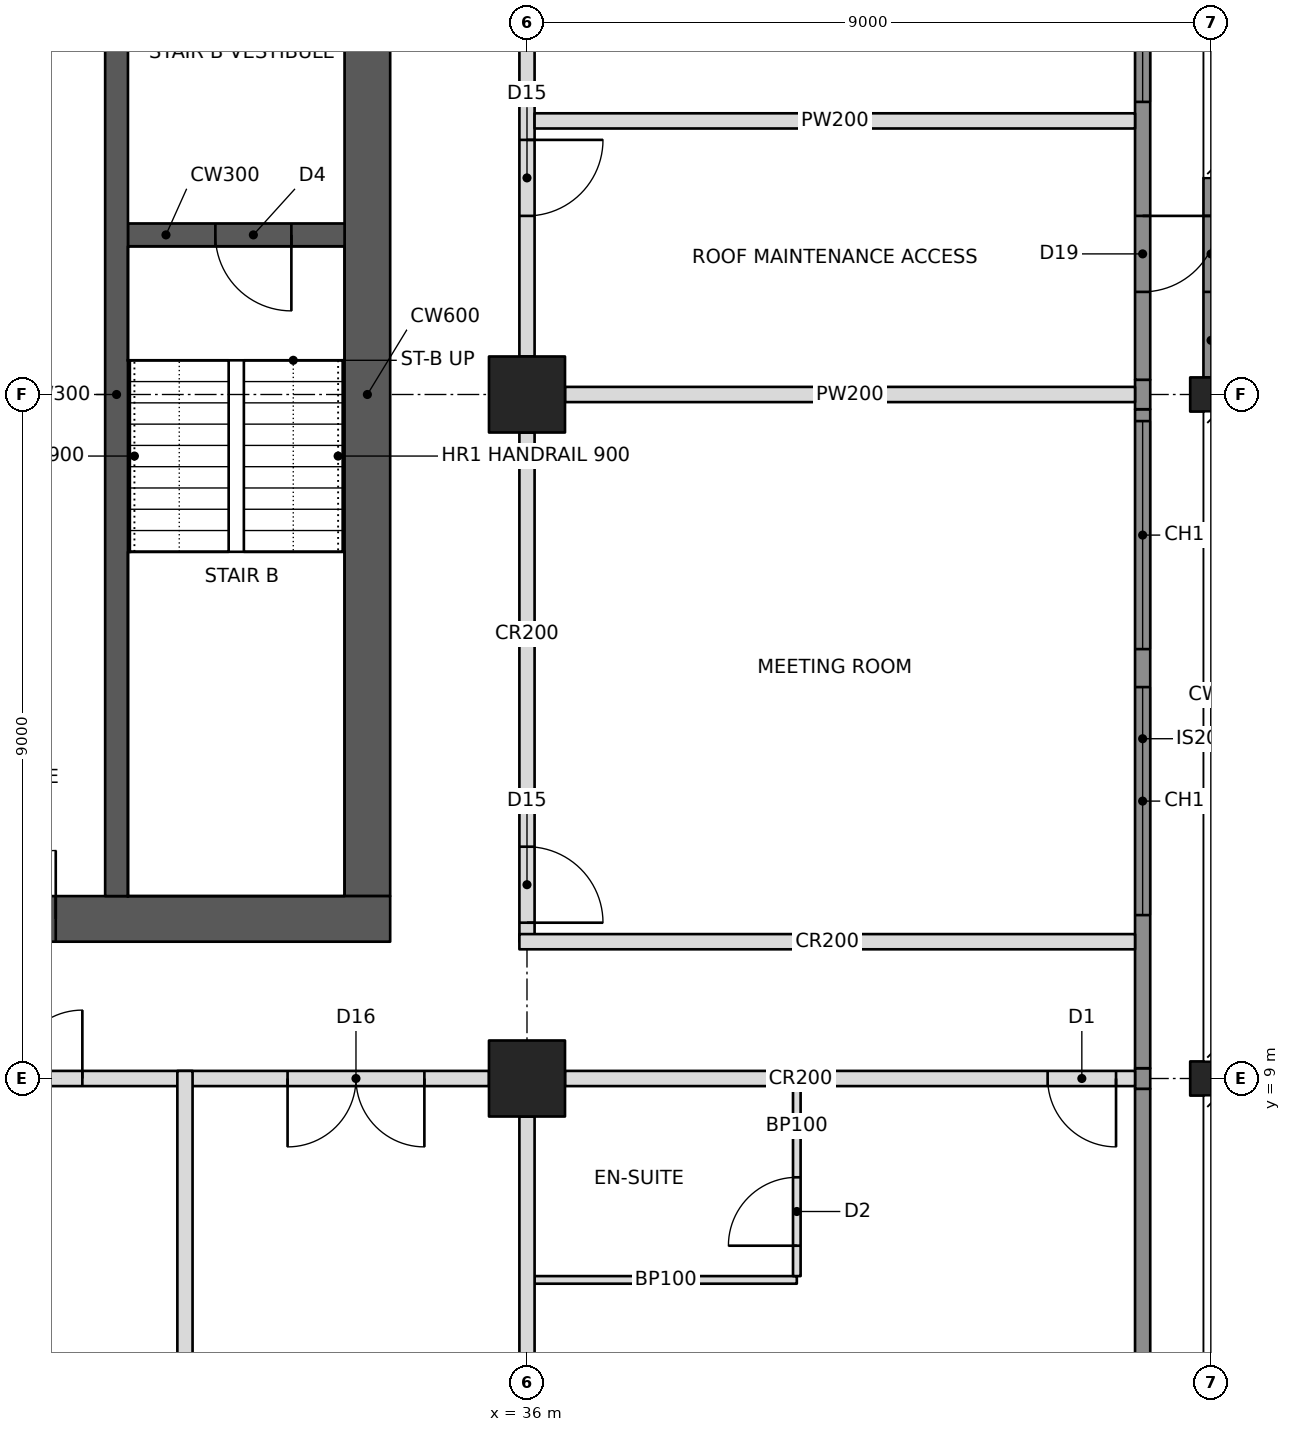
"""IFC4 building model, lengths in metres.
Left out: names, types, materials, properties, quantities, classifications, styles, units other than length and angle.
Written with IfcOpenShell. Run it as: python <this file> out.ifc"""

import sys

from ifc_helpers import new_model, si_unit, direction, frame, frame_2d, origin, origin_2d, place, context, subcontext, project, spatial, rectangle, hollow_rectangle, i_section, extrude, element, fill, save


model = new_model("IFC4")
c1 = context("Model", 3, precision=1e-05, world=origin(), true_north=direction((0.0, 1.0)))
c2 = subcontext(c1, "Body", "Model", "MODEL_VIEW")
j1 = project(units=[si_unit("LENGTHUNIT", "METRE"), si_unit("PLANEANGLEUNIT", "RADIAN")], contexts=[c1])
p1 = place(None, origin())
s1 = spatial("IfcSite", under=j1, at=p1, CompositionType="ELEMENT")
p2 = place(p1, origin())
s2 = spatial("IfcBuilding", under=s1, at=p2, CompositionType="ELEMENT")
p3 = place(p2, frame((0.0, 0.0, 94.2)))
s3 = spatial("IfcBuildingStorey", under=s2, at=p3, CompositionType="ELEMENT", Elevation=94.2)
for number, where, z_axis, x_axis in (
    (1, (36.0, 9.0, 0.0), (0.0, 0.0, 1.0), (0.0, 1.0, 0.0)),
    (2, (36.0, 18.0, 0.0), (0.0, 0.0, 1.0), (0.0, 1.0, 0.0)),
):
    element("IfcColumn", number, at=place(p3, frame(where, z_axis=z_axis, x_axis=x_axis)), inside=s3, PredefinedType="COLUMN", context=c2, shape_type="SweptSolid", body=[
        extrude(hollow_rectangle(XDim=1.0, YDim=1.0, WallThickness=0.1, at=origin_2d()), origin(), (0.0, 0.0, 1.0), 3.4),
    ])
for number, where, z_axis, x_axis in (
    (3, (45.0, 9.0, 0.0), (0.0, 0.0, 1.0), (0.0, 1.0, 0.0)),
    (4, (45.0, 18.0, 0.0), (0.0, 0.0, 1.0), (0.0, 1.0, 0.0)),
):
    element("IfcColumn", number, at=place(p3, frame(where, z_axis=z_axis, x_axis=x_axis)), inside=s3, PredefinedType="COLUMN", context=c2, shape_type="SweptSolid", body=[
        extrude(i_section(OverallWidth=0.449, OverallDepth=0.549, WebThickness=0.072, FlangeThickness=0.115, at=origin_2d()), origin(), (0.0, 0.0, 1.0), 3.4),
    ])
p4 = place(p3, frame((10.8, 11.1, 0.0), z_axis=(0.0, 0.0, 1.0), x_axis=(1.0, 0.0, 0.0)))
e5 = element("IfcWall", 5, at=p4, inside=s3, PredefinedType="SHEAR", context=c2, shape_type="SweptSolid", body=[
    extrude(rectangle(XDim=23.4, YDim=0.6, at=frame_2d((11.7, 0.0))), origin(), (0.0, 0.0, 1.0), 3.4),
])
p5 = place(p4, frame((1.0, 0.0, 0.0)))
e6 = element("IfcOpeningElement", 6, at=p5, cuts=e5, PredefinedType="OPENING", context=c2, shape_type="SweptSolid", body=[
    extrude(rectangle(XDim=1.0, YDim=2.1, at=frame_2d((0.5, 1.05))), frame((0.0, 0.31, 0.0), z_axis=(0.0, -1.0, 0.0), x_axis=(1.0, 0.0, 0.0)), (0.0, 0.0, 1.0), 0.62),
])
p6 = place(p4, frame((17.2, 0.0, 0.0)))
e7 = element("IfcOpeningElement", 7, at=p6, cuts=e5, PredefinedType="OPENING", context=c2, shape_type="SweptSolid", body=[
    extrude(rectangle(XDim=1.8, YDim=2.1, at=frame_2d((0.9, 1.05))), frame((0.0, 0.31, 0.0), z_axis=(0.0, -1.0, 0.0), x_axis=(1.0, 0.0, 0.0)), (0.0, 0.0, 1.0), 0.62),
])
p7 = place(p3, frame((33.9, 11.4, 0.0), z_axis=(0.0, 0.0, 1.0), x_axis=(0.0, 1.0, 0.0)))
e8 = element("IfcWall", 8, at=p7, inside=s3, PredefinedType="SHEAR", context=c2, shape_type="SweptSolid", body=[
    extrude(rectangle(XDim=13.2, YDim=0.6, at=frame_2d((6.6, 0.0))), origin(), (0.0, 0.0, 1.0), 3.4),
])
p8 = place(p3, frame((30.6, 11.4, 0.0), z_axis=(0.0, 0.0, 1.0), x_axis=(0.0, 1.0, 0.0)))
e9 = element("IfcWall", 9, at=p8, inside=s3, PredefinedType="SHEAR", context=c2, shape_type="SweptSolid", body=[
    extrude(rectangle(XDim=13.2, YDim=0.3, at=frame_2d((6.6, 0.0))), origin(), (0.0, 0.0, 1.0), 3.4),
])
p9 = place(p3, frame((30.75, 20.1, 0.0), z_axis=(0.0, 0.0, 1.0), x_axis=(1.0, 0.0, 0.0)))
e10 = element("IfcWall", 10, at=p9, inside=s3, PredefinedType="SHEAR", context=c2, shape_type="SweptSolid", body=[
    extrude(rectangle(XDim=2.85, YDim=0.3, at=frame_2d((1.425, 0.0))), origin(), (0.0, 0.0, 1.0), 3.4),
])
p10 = place(p9, frame((1.15, 0.0, 0.0)))
e11 = element("IfcOpeningElement", 11, at=p10, cuts=e10, PredefinedType="OPENING", context=c2, shape_type="SweptSolid", body=[
    extrude(rectangle(XDim=1.0, YDim=2.1, at=frame_2d((0.5, 1.05))), frame((0.0, 0.16, 0.0), z_axis=(0.0, -1.0, 0.0), x_axis=(1.0, 0.0, 0.0)), (0.0, 0.0, 1.0), 0.32),
])
p11 = place(p3, frame((45.0, 20.85, 0.0), z_axis=(0.0, 0.0, 1.0), x_axis=(0.0, -1.0, 0.0)))
e12 = element("IfcWall", 12, at=p11, inside=s3, PredefinedType="SOLIDWALL", context=c2, shape_type="SweptSolid", body=[
    extrude(rectangle(XDim=2.625, YDim=0.2, at=frame_2d((1.312, 0.0))), origin(), (0.0, 0.0, 1.0), 2.42),
])
p12 = place(p11, frame((0.5, 0.0, 0.0)))
e13 = element("IfcOpeningElement", 13, at=p12, cuts=e12, PredefinedType="OPENING", context=c2, shape_type="SweptSolid", body=[
    extrude(rectangle(XDim=1.0, YDim=2.1, at=frame_2d((0.5, 1.05))), frame((0.0, 0.11, 0.0), z_axis=(0.0, -1.0, 0.0), x_axis=(1.0, 0.0, 0.0)), (0.0, 0.0, 1.0), 0.22),
])
p13 = place(p3, frame((27.5, 9.0, 0.0), z_axis=(0.0, 0.0, 1.0), x_axis=(1.0, 0.0, 0.0)))
e14 = element("IfcWall", 14, at=p13, inside=s3, PredefinedType="PARTITIONING", context=c2, shape_type="SweptSolid", body=[
    extrude(rectangle(XDim=8.0, YDim=0.2, at=frame_2d((4.0, 0.0))), origin(), (0.0, 0.0, 1.0), 2.405),
])
p14 = place(p13, frame((0.85, 0.0, 0.0)))
e15 = element("IfcOpeningElement", 15, at=p14, cuts=e14, PredefinedType="OPENING", context=c2, shape_type="SweptSolid", body=[
    extrude(rectangle(XDim=1.8, YDim=2.4, at=frame_2d((0.9, 1.2))), frame((0.0, 0.11, 0.0), z_axis=(0.0, -1.0, 0.0), x_axis=(1.0, 0.0, 0.0)), (0.0, 0.0, 1.0), 0.22),
])
p15 = place(p13, frame((5.35, 0.0, 0.0)))
e16 = element("IfcOpeningElement", 16, at=p15, cuts=e14, PredefinedType="OPENING", context=c2, shape_type="SweptSolid", body=[
    extrude(rectangle(XDim=1.8, YDim=2.4, at=frame_2d((0.9, 1.2))), frame((0.0, 0.11, 0.0), z_axis=(0.0, -1.0, 0.0), x_axis=(1.0, 0.0, 0.0)), (0.0, 0.0, 1.0), 0.22),
])
p16 = place(p3, frame((36.5, 9.0, 0.0), z_axis=(0.0, 0.0, 1.0), x_axis=(1.0, 0.0, 0.0)))
e17 = element("IfcWall", 17, at=p16, inside=s3, PredefinedType="PARTITIONING", context=c2, shape_type="SweptSolid", body=[
    extrude(rectangle(XDim=7.5, YDim=0.2, at=frame_2d((3.75, 0.0))), origin(), (0.0, 0.0, 1.0), 2.438),
])
p17 = place(p16, frame((6.35, 0.0, 0.0)))
e18 = element("IfcOpeningElement", 18, at=p17, cuts=e17, PredefinedType="OPENING", context=c2, shape_type="SweptSolid", body=[
    extrude(rectangle(XDim=0.9, YDim=2.1, at=frame_2d((0.45, 1.05))), frame((0.0, 0.11, 0.0), z_axis=(0.0, -1.0, 0.0), x_axis=(1.0, 0.0, 0.0)), (0.0, 0.0, 1.0), 0.22),
])
p18 = place(p3, frame((36.0, 10.8, 0.0), z_axis=(0.0, 0.0, 1.0), x_axis=(0.0, 1.0, 0.0)))
e19 = element("IfcWall", 19, at=p18, inside=s3, PredefinedType="PARTITIONING", context=c2, shape_type="SweptSolid", body=[
    extrude(rectangle(XDim=6.7, YDim=0.2, at=frame_2d((3.35, 0.0))), origin(), (0.0, 0.0, 1.0), 2.405),
])
p19 = place(p18, frame((0.25, 0.0, 0.0)))
e20 = element("IfcOpeningElement", 20, at=p19, cuts=e19, PredefinedType="OPENING", context=c2, shape_type="SweptSolid", body=[
    extrude(rectangle(XDim=1.0, YDim=2.1, at=frame_2d((0.5, 1.05))), frame((0.0, 0.11, 0.0), z_axis=(0.0, -1.0, 0.0), x_axis=(1.0, 0.0, 0.0)), (0.0, 0.0, 1.0), 0.22),
])
p20 = place(p3, frame((36.0, 18.5, 0.0), z_axis=(0.0, 0.0, 1.0), x_axis=(0.0, 1.0, 0.0)))
e21 = element("IfcWall", 21, at=p20, inside=s3, PredefinedType="PARTITIONING", context=c2, shape_type="SweptSolid", body=[
    extrude(rectangle(XDim=6.7, YDim=0.2, at=frame_2d((3.35, 0.0))), origin(), (0.0, 0.0, 1.0), 2.405),
])
p21 = place(p20, frame((5.45, 0.0, 0.0)))
e22 = element("IfcOpeningElement", 22, at=p21, cuts=e21, PredefinedType="OPENING", context=c2, shape_type="SweptSolid", body=[
    extrude(rectangle(XDim=1.0, YDim=2.1, at=frame_2d((0.5, 1.05))), frame((0.0, 0.11, 0.0), z_axis=(0.0, -1.0, 0.0), x_axis=(1.0, 0.0, 0.0)), (0.0, 0.0, 1.0), 0.22),
])
p22 = place(p20, frame((1.85, 0.0, 0.0)))
e23 = element("IfcOpeningElement", 23, at=p22, cuts=e21, PredefinedType="OPENING", context=c2, shape_type="SweptSolid", body=[
    extrude(rectangle(XDim=1.0, YDim=2.1, at=frame_2d((0.5, 1.05))), frame((0.0, 0.11, 0.0), z_axis=(0.0, -1.0, 0.0), x_axis=(1.0, 0.0, 0.0)), (0.0, 0.0, 1.0), 0.22),
])
p23 = place(p3, frame((35.9, 10.8, 0.0), z_axis=(0.0, 0.0, 1.0), x_axis=(1.0, 0.0, 0.0)))
e24 = element("IfcWall", 24, at=p23, inside=s3, PredefinedType="PARTITIONING", context=c2, shape_type="SweptSolid", body=[
    extrude(rectangle(XDim=8.1, YDim=0.2, at=frame_2d((4.05, 0.0))), origin(), (0.0, 0.0, 1.0), 2.404),
])
p24 = place(p3, frame((36.0, 8.5, 0.0), z_axis=(0.0, 0.0, 1.0), x_axis=(0.0, -1.0, 0.0)))
e25 = element("IfcWall", 25, at=p24, inside=s3, PredefinedType="PARTITIONING", context=c2, shape_type="SweptSolid", body=[
    extrude(rectangle(XDim=7.5, YDim=0.2, at=frame_2d((3.75, 0.0))), origin(), (0.0, 0.0, 1.0), 2.438),
])
p25 = place(p3, frame((31.5, 9.1, 0.0), z_axis=(0.0, 0.0, 1.0), x_axis=(0.0, -1.0, 0.0)))
e26 = element("IfcWall", 26, at=p25, inside=s3, PredefinedType="PARTITIONING", context=c2, shape_type="SweptSolid", body=[
    extrude(rectangle(XDim=8.1, YDim=0.2, at=frame_2d((4.05, 0.0))), origin(), (0.0, 0.0, 1.0), 2.404),
])
p26 = place(p3, frame((36.1, 6.35, 0.0), z_axis=(0.0, 0.0, 1.0), x_axis=(1.0, 0.0, 0.0)))
e27 = element("IfcWall", 27, at=p26, inside=s3, PredefinedType="PARTITIONING", context=c2, shape_type="SweptSolid", body=[
    extrude(rectangle(XDim=3.45, YDim=0.1, at=frame_2d((1.725, 0.0))), origin(), (0.0, 0.0, 1.0), 2.438),
])
p27 = place(p3, frame((39.55, 8.9, 0.0), z_axis=(0.0, 0.0, 1.0), x_axis=(0.0, -1.0, 0.0)))
e28 = element("IfcWall", 28, at=p27, inside=s3, PredefinedType="PARTITIONING", context=c2, shape_type="SweptSolid", body=[
    extrude(rectangle(XDim=2.5, YDim=0.1, at=frame_2d((1.25, 0.0))), origin(), (0.0, 0.0, 1.0), 2.438),
])
p28 = place(p27, frame((1.2, 0.0, 0.0)))
e29 = element("IfcOpeningElement", 29, at=p28, cuts=e28, PredefinedType="OPENING", context=c2, shape_type="SweptSolid", body=[
    extrude(rectangle(XDim=0.9, YDim=2.1, at=frame_2d((0.45, 1.05))), frame((0.0, 0.06, 0.0), z_axis=(0.0, -1.0, 0.0), x_axis=(1.0, 0.0, 0.0)), (0.0, 0.0, 1.0), 0.12),
])
p29 = place(p3, frame((36.5, 18.0, 0.0), z_axis=(0.0, 0.0, 1.0), x_axis=(1.0, 0.0, 0.0)))
e30 = element("IfcWall", 30, at=p29, inside=s3, PredefinedType="PARTITIONING", context=c2, shape_type="SweptSolid", body=[
    extrude(rectangle(XDim=7.5, YDim=0.2, at=frame_2d((3.75, 0.0))), origin(), (0.0, 0.0, 1.0), 2.405),
])
p30 = place(p3, frame((36.1, 21.6, 0.0), z_axis=(0.0, 0.0, 1.0), x_axis=(1.0, 0.0, 0.0)))
e31 = element("IfcWall", 31, at=p30, inside=s3, PredefinedType="PARTITIONING", context=c2, shape_type="SweptSolid", body=[
    extrude(rectangle(XDim=7.9, YDim=0.2, at=frame_2d((3.95, 0.0))), origin(), (0.0, 0.0, 1.0), 2.404),
])
p31 = place(p3, frame((44.1, 4.607, 0.0), z_axis=(0.0, 0.0, 1.0), x_axis=(0.0, 1.0, 0.0)))
e32 = element("IfcWall", 32, at=p31, inside=s3, PredefinedType="SOLIDWALL", context=c2, shape_type="SweptSolid", body=[
    extrude(rectangle(XDim=4.257, YDim=0.2, at=frame_2d((2.129, 0.0))), origin(), (0.0, 0.0, 1.0), 3.2),
])
p32 = place(p3, frame((44.1, 8.865, 0.0), z_axis=(0.0, 0.0, 1.0), x_axis=(0.0, 1.0, 0.0)))
e33 = element("IfcWall", 33, at=p32, inside=s3, PredefinedType="SOLIDWALL", context=c2, shape_type="SweptSolid", body=[
    extrude(rectangle(XDim=0.271, YDim=0.2, at=frame_2d((0.135, 0.0))), origin(), (0.0, 0.0, 1.0), 2.438),
])
p33 = place(p3, frame((44.1, 9.135, 0.0), z_axis=(0.0, 0.0, 1.0), x_axis=(0.0, 1.0, 0.0)))
e34 = element("IfcWall", 34, at=p33, inside=s3, PredefinedType="SOLIDWALL", context=c2, shape_type="SweptSolid", body=[
    extrude(rectangle(XDim=8.671, YDim=0.2, at=frame_2d((4.335, 0.0))), origin(), (0.0, 0.0, 1.0), 3.2),
])
p34 = place(p33, frame((2.015, 0.0, 0.6)))
e35 = element("IfcOpeningElement", 35, at=p34, cuts=e34, PredefinedType="OPENING", context=c2, shape_type="SweptSolid", body=[
    extrude(rectangle(XDim=3.0, YDim=2.2, at=frame_2d((1.5, 1.1))), frame((0.0, 0.11, 0.0), z_axis=(0.0, -1.0, 0.0), x_axis=(1.0, 0.0, 0.0)), (0.0, 0.0, 1.0), 0.22),
])
p35 = place(p33, frame((5.515, 0.0, 0.6)))
e36 = element("IfcOpeningElement", 36, at=p35, cuts=e34, PredefinedType="OPENING", context=c2, shape_type="SweptSolid", body=[
    extrude(rectangle(XDim=3.0, YDim=2.2, at=frame_2d((1.5, 1.1))), frame((0.0, 0.11, 0.0), z_axis=(0.0, -1.0, 0.0), x_axis=(1.0, 0.0, 0.0)), (0.0, 0.0, 1.0), 0.22),
])
p36 = place(p3, frame((44.1, 17.806, 0.0), z_axis=(0.0, 0.0, 1.0), x_axis=(0.0, 1.0, 0.0)))
e37 = element("IfcWall", 37, at=p36, inside=s3, PredefinedType="SOLIDWALL", context=c2, shape_type="SweptSolid", body=[
    extrude(rectangle(XDim=0.388, YDim=0.2, at=frame_2d((0.194, 0.0))), origin(), (0.0, 0.0, 1.0), 2.404),
])
p37 = place(p3, frame((44.1, 18.194, 0.0), z_axis=(0.0, 0.0, 1.0), x_axis=(0.0, 1.0, 0.0)))
e38 = element("IfcWall", 38, at=p37, inside=s3, PredefinedType="SOLIDWALL", context=c2, shape_type="SweptSolid", body=[
    extrude(rectangle(XDim=8.671, YDim=0.2, at=frame_2d((4.335, 0.0))), origin(), (0.0, 0.0, 1.0), 3.2),
])
p38 = place(p37, frame((3.656, 0.0, 0.6)))
e39 = element("IfcOpeningElement", 39, at=p38, cuts=e38, PredefinedType="OPENING", context=c2, shape_type="SweptSolid", body=[
    extrude(rectangle(XDim=3.0, YDim=2.2, at=frame_2d((1.5, 1.1))), frame((0.0, 0.11, 0.0), z_axis=(0.0, -1.0, 0.0), x_axis=(1.0, 0.0, 0.0)), (0.0, 0.0, 1.0), 0.22),
])
p39 = place(p37, frame((1.156, 0.0, 0.0)))
e40 = element("IfcOpeningElement", 40, at=p39, cuts=e38, PredefinedType="OPENING", context=c2, shape_type="SweptSolid", body=[
    extrude(rectangle(XDim=1.0, YDim=2.1, at=frame_2d((0.5, 1.05))), frame((0.0, 0.11, 0.0), z_axis=(0.0, -1.0, 0.0), x_axis=(1.0, 0.0, 0.0)), (0.0, 0.0, 1.0), 0.22),
])
p40 = place(p34, origin())
e41 = element("IfcWindow", 41, at=p40, inside=s3, PartitioningType="TRIPLE_PANEL_VERTICAL", PredefinedType="WINDOW", context=c2, shape_type="SweptSolid", body=[
    extrude(rectangle(XDim=3.0, YDim=2.2, at=frame_2d((1.5, 1.1))), frame((0.0, 0.03, 0.0), z_axis=(0.0, -1.0, 0.0), x_axis=(1.0, 0.0, 0.0)), (0.0, 0.0, 1.0), 0.06),
])
fill(e35, e41)
p41 = place(p35, origin())
e42 = element("IfcWindow", 42, at=p41, inside=s3, PartitioningType="TRIPLE_PANEL_VERTICAL", PredefinedType="WINDOW", context=c2, shape_type="SweptSolid", body=[
    extrude(rectangle(XDim=3.0, YDim=2.2, at=frame_2d((1.5, 1.1))), frame((0.0, 0.03, 0.0), z_axis=(0.0, -1.0, 0.0), x_axis=(1.0, 0.0, 0.0)), (0.0, 0.0, 1.0), 0.06),
])
fill(e36, e42)
p42 = place(p38, origin())
e43 = element("IfcWindow", 43, at=p42, inside=s3, PartitioningType="TRIPLE_PANEL_VERTICAL", PredefinedType="WINDOW", context=c2, shape_type="SweptSolid", body=[
    extrude(rectangle(XDim=3.0, YDim=2.2, at=frame_2d((1.5, 1.1))), frame((0.0, 0.03, 0.0), z_axis=(0.0, -1.0, 0.0), x_axis=(1.0, 0.0, 0.0)), (0.0, 0.0, 1.0), 0.06),
])
fill(e39, e43)
p43 = place(p39, frame((1.0, 0.0, 0.0), z_axis=(0.0, 0.0, 1.0), x_axis=(-1.0, 0.0, 0.0)))
e44 = element("IfcDoor", 44, at=p43, inside=s3, OperationType="SINGLE_SWING_LEFT", PredefinedType="DOOR", context=c2, shape_type="SweptSolid", body=[
    extrude(rectangle(XDim=1.0, YDim=2.1, at=frame_2d((0.5, 1.05))), frame((0.0, 0.025, 0.0), z_axis=(0.0, -1.0, 0.0), x_axis=(1.0, 0.0, 0.0)), (0.0, 0.0, 1.0), 0.05),
])
fill(e40, e44)
p44 = place(p12, origin())
e45 = element("IfcDoor", 45, at=p44, inside=s3, OperationType="SINGLE_SWING_LEFT", PredefinedType="DOOR", context=c2, shape_type="SweptSolid", body=[
    extrude(rectangle(XDim=1.0, YDim=2.1, at=frame_2d((0.5, 1.05))), frame((0.0, 0.025, 0.0), z_axis=(0.0, -1.0, 0.0), x_axis=(1.0, 0.0, 0.0)), (0.0, 0.0, 1.0), 0.05),
])
fill(e13, e45)
p45 = place(p14, origin())
e46 = element("IfcDoor", 46, at=p45, inside=s3, OperationType="DOUBLE_DOOR_SINGLE_SWING", PredefinedType="DOOR", context=c2, shape_type="SweptSolid", body=[
    extrude(rectangle(XDim=1.8, YDim=2.4, at=frame_2d((0.9, 1.2))), frame((0.0, 0.025, 0.0), z_axis=(0.0, -1.0, 0.0), x_axis=(1.0, 0.0, 0.0)), (0.0, 0.0, 1.0), 0.05),
])
fill(e15, e46)
p46 = place(p15, frame((1.8, 0.0, 0.0), z_axis=(0.0, 0.0, 1.0), x_axis=(-1.0, 0.0, 0.0)))
e47 = element("IfcDoor", 47, at=p46, inside=s3, OperationType="DOUBLE_DOOR_SINGLE_SWING", PredefinedType="DOOR", context=c2, shape_type="SweptSolid", body=[
    extrude(rectangle(XDim=1.8, YDim=2.4, at=frame_2d((0.9, 1.2))), frame((0.0, 0.025, 0.0), z_axis=(0.0, -1.0, 0.0), x_axis=(1.0, 0.0, 0.0)), (0.0, 0.0, 1.0), 0.05),
])
fill(e16, e47)
p47 = place(p28, frame((0.9, 0.0, 0.0), z_axis=(0.0, 0.0, 1.0), x_axis=(-1.0, 0.0, 0.0)))
e48 = element("IfcDoor", 48, at=p47, inside=s3, OperationType="SINGLE_SWING_LEFT", PredefinedType="DOOR", context=c2, shape_type="SweptSolid", body=[
    extrude(rectangle(XDim=0.9, YDim=2.1, at=frame_2d((0.45, 1.05))), frame((0.0, 0.025, 0.0), z_axis=(0.0, -1.0, 0.0), x_axis=(1.0, 0.0, 0.0)), (0.0, 0.0, 1.0), 0.05),
])
fill(e29, e48)
p48 = place(p17, frame((0.9, 0.0, 0.0), z_axis=(0.0, 0.0, 1.0), x_axis=(-1.0, 0.0, 0.0)))
e49 = element("IfcDoor", 49, at=p48, inside=s3, OperationType="SINGLE_SWING_LEFT", PredefinedType="DOOR", context=c2, shape_type="SweptSolid", body=[
    extrude(rectangle(XDim=0.9, YDim=2.1, at=frame_2d((0.45, 1.05))), frame((0.0, 0.025, 0.0), z_axis=(0.0, -1.0, 0.0), x_axis=(1.0, 0.0, 0.0)), (0.0, 0.0, 1.0), 0.05),
])
fill(e18, e49)
p49 = place(p19, frame((1.0, 0.0, 0.0), z_axis=(0.0, 0.0, 1.0), x_axis=(-1.0, 0.0, 0.0)))
e50 = element("IfcDoor", 50, at=p49, inside=s3, OperationType="SINGLE_SWING_RIGHT", PredefinedType="DOOR", context=c2, shape_type="SweptSolid", body=[
    extrude(rectangle(XDim=1.0, YDim=2.1, at=frame_2d((0.5, 1.05))), frame((0.0, 0.025, 0.0), z_axis=(0.0, -1.0, 0.0), x_axis=(1.0, 0.0, 0.0)), (0.0, 0.0, 1.0), 0.05),
])
fill(e20, e50)
p50 = place(p22, frame((1.0, 0.0, 0.0), z_axis=(0.0, 0.0, 1.0), x_axis=(-1.0, 0.0, 0.0)))
e51 = element("IfcDoor", 51, at=p50, inside=s3, OperationType="SINGLE_SWING_LEFT", PredefinedType="DOOR", context=c2, shape_type="SweptSolid", body=[
    extrude(rectangle(XDim=1.0, YDim=2.1, at=frame_2d((0.5, 1.05))), frame((0.0, 0.025, 0.0), z_axis=(0.0, -1.0, 0.0), x_axis=(1.0, 0.0, 0.0)), (0.0, 0.0, 1.0), 0.05),
])
fill(e23, e51)
p51 = place(p6, origin())
e52 = element("IfcDoor", 52, at=p51, inside=s3, OperationType="DOUBLE_DOOR_SINGLE_SWING", PredefinedType="DOOR", context=c2, shape_type="SweptSolid", body=[
    extrude(rectangle(XDim=1.8, YDim=2.1, at=frame_2d((0.9, 1.05))), frame((0.0, 0.025, 0.0), z_axis=(0.0, -1.0, 0.0), x_axis=(1.0, 0.0, 0.0)), (0.0, 0.0, 1.0), 0.05),
])
fill(e7, e52)
p52 = place(p10, frame((1.0, 0.0, 0.0), z_axis=(0.0, 0.0, 1.0), x_axis=(-1.0, 0.0, 0.0)))
e53 = element("IfcDoor", 53, at=p52, inside=s3, OperationType="SINGLE_SWING_LEFT", PredefinedType="DOOR", context=c2, shape_type="SweptSolid", body=[
    extrude(rectangle(XDim=1.0, YDim=2.1, at=frame_2d((0.5, 1.05))), frame((0.0, 0.025, 0.0), z_axis=(0.0, -1.0, 0.0), x_axis=(1.0, 0.0, 0.0)), (0.0, 0.0, 1.0), 0.05),
])
fill(e11, e53)
save(model, sys.argv[1])
